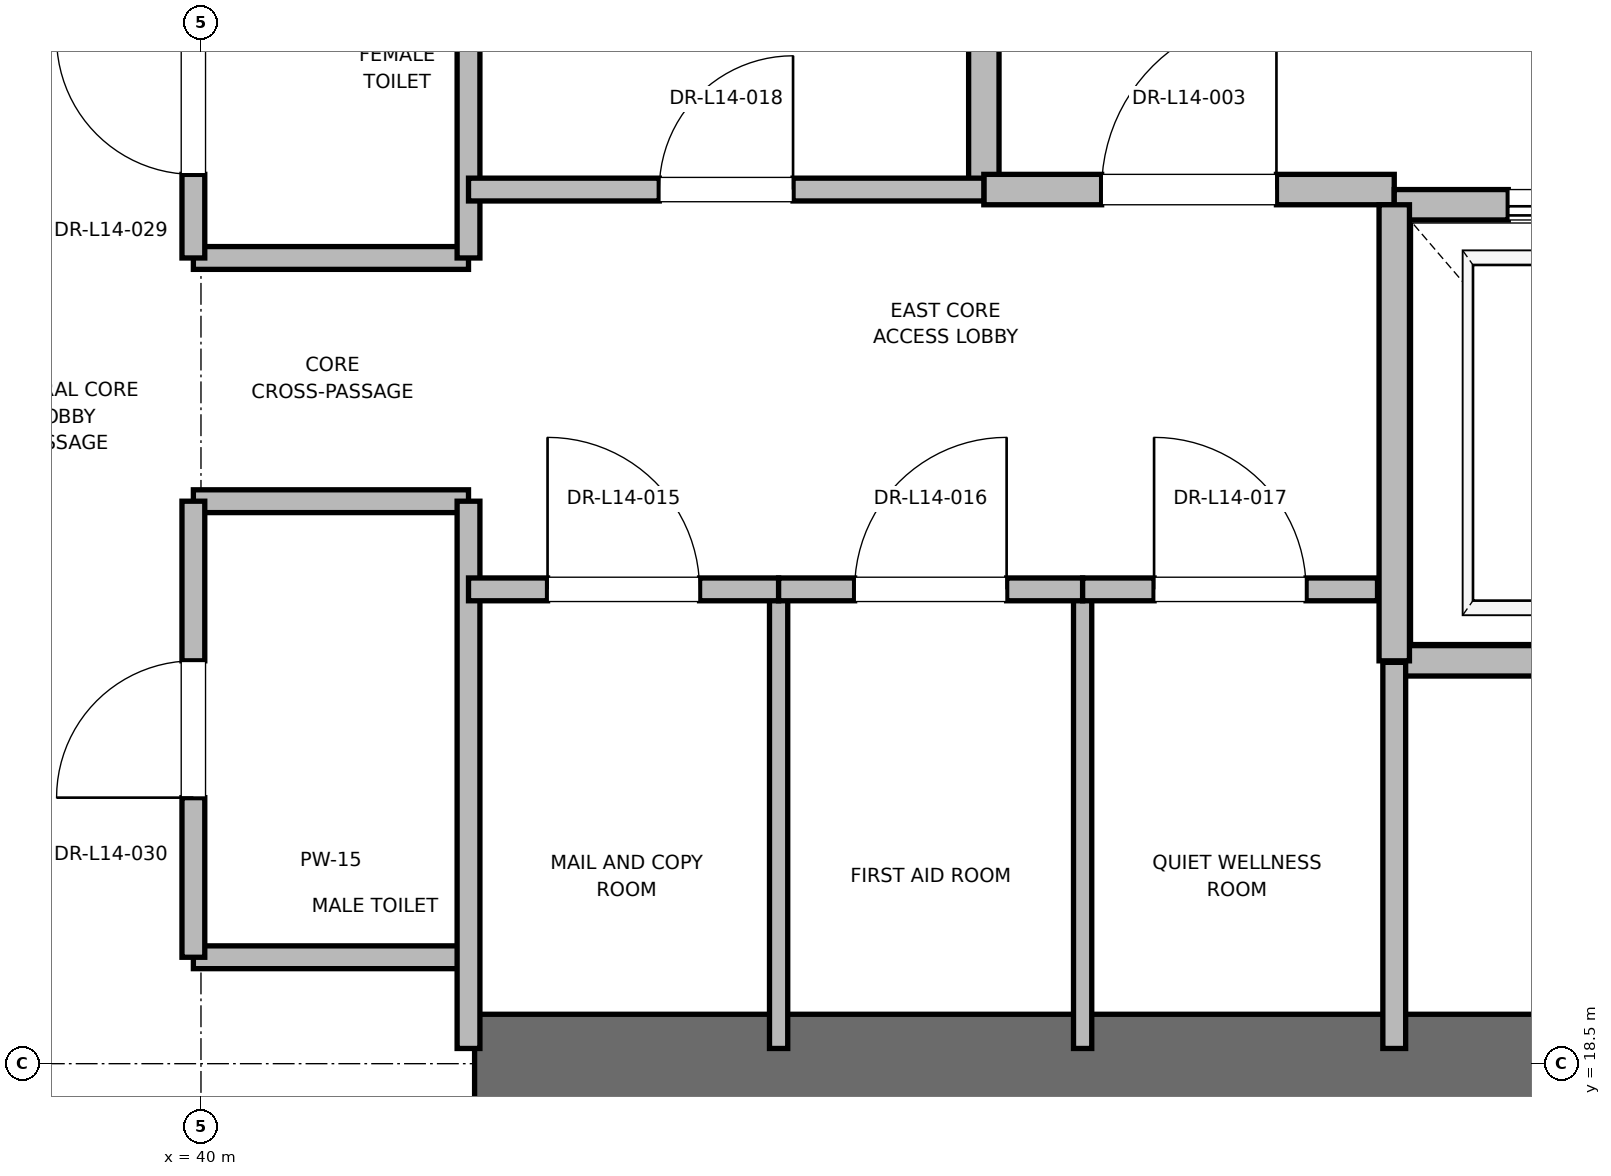
"""IFC4 building model, lengths in metres.
Left out: names, types, materials, properties, quantities, classifications, styles, units other than length and angle.
Written with IfcOpenShell. Run it as: python <this file> out.ifc"""

import sys

from ifc_helpers import new_model, si_unit, direction, frame, frame_2d, origin, place, context, subcontext, project, spatial, rectangle, extrude, element, fill, save


model = new_model("IFC4")
c1 = context("Model", 3, precision=1e-05, world=origin(), true_north=direction((0.0, 1.0)))
c2 = subcontext(c1, "Body", "Model", "MODEL_VIEW")
j1 = project(units=[si_unit("LENGTHUNIT", "METRE"), si_unit("PLANEANGLEUNIT", "RADIAN")], contexts=[c1])
p1 = place(None, origin())
s1 = spatial("IfcSite", under=j1, at=p1, CompositionType="ELEMENT")
p2 = place(p1, origin())
s2 = spatial("IfcBuilding", under=s1, at=p2, CompositionType="ELEMENT")
p3 = place(p2, frame((0.0, 0.0, 63.6)))
s3 = spatial("IfcBuildingStorey", under=s2, at=p3, CompositionType="ELEMENT", Elevation=63.6)
p4 = place(p3, frame((41.8, 18.5, 0.0), z_axis=(0.0, 0.0, 1.0), x_axis=(1.0, 0.0, 0.0)))
e1 = element("IfcWall", 1, at=p4, inside=s3, PredefinedType="SHEAR", context=c2, shape_type="SweptSolid", body=[
    extrude(rectangle(XDim=9.2, YDim=0.65, at=frame_2d((4.6, 0.0))), origin(), (0.0, 0.0, 1.0), 3.76),
])
p5 = place(p3, frame((45.15, 24.25, 0.0), z_axis=(0.0, 0.0, 1.0), x_axis=(0.0, 1.0, 0.0)))
e2 = element("IfcWall", 2, at=p5, inside=s3, PredefinedType="PARTITIONING", context=c2, shape_type="SweptSolid", body=[
    extrude(rectangle(XDim=3.37, YDim=0.2, at=frame_2d((1.685, 0.0))), origin(), (0.0, 0.0, 1.0), 3.76),
])
p6 = place(p3, frame((45.15, 24.25, 0.0), z_axis=(0.0, 0.0, 1.0), x_axis=(1.0, 0.0, 0.0)))
e3 = element("IfcWall", 3, at=p6, inside=s3, PredefinedType="PARTITIONING", context=c2, shape_type="SweptSolid", body=[
    extrude(rectangle(XDim=2.7, YDim=0.2, at=frame_2d((1.35, 0.0))), origin(), (0.0, 0.0, 1.0), 3.76),
])
p7 = place(p6, frame((0.775, 0.0, 0.0)))
e4 = element("IfcOpeningElement", 4, at=p7, cuts=e3, PredefinedType="OPENING", context=c2, shape_type="SweptSolid", body=[
    extrude(rectangle(XDim=1.15, YDim=2.2, at=frame_2d((0.575, 1.1))), frame((0.0, 0.1, 0.0), z_axis=(0.0, -1.0, 0.0), x_axis=(1.0, 0.0, 0.0)), (0.0, 0.0, 1.0), 0.2),
])
p8 = place(p3, frame((47.85, 21.15, 0.0), z_axis=(0.0, 0.0, 1.0), x_axis=(1.0, 0.0, 0.0)))
e5 = element("IfcWall", 5, at=p8, inside=s3, PredefinedType="SOLIDWALL", context=c2, shape_type="SweptSolid", body=[
    extrude(rectangle(XDim=2.6, YDim=0.2, at=frame_2d((1.3, 0.0))), origin(), (0.0, 0.0, 1.0), 3.76),
])
p9 = place(p3, frame((50.45, 24.15, 0.0), z_axis=(0.0, 0.0, 1.0), x_axis=(-1.0, 0.0, 0.0)))
e6 = element("IfcWall", 6, at=p9, inside=s3, PredefinedType="SOLIDWALL", context=c2, shape_type="SweptSolid", body=[
    extrude(rectangle(XDim=2.6, YDim=0.2, at=frame_2d((1.3, 0.0))), origin(), (0.0, 0.0, 1.0), 2.54),
])
p10 = place(p9, frame((0.75, 0.0, 0.0)))
e7 = element("IfcOpeningElement", 7, at=p10, cuts=e6, PredefinedType="OPENING", context=c2, shape_type="SweptSolid", body=[
    extrude(rectangle(XDim=1.1, YDim=2.2, at=frame_2d((0.55, 1.1))), frame((0.0, 0.1, 0.0), z_axis=(0.0, -1.0, 0.0), x_axis=(1.0, 0.0, 0.0)), (0.0, 0.0, 1.0), 0.2),
])
p11 = place(p3, frame((47.85, 24.15, 0.0), z_axis=(0.0, 0.0, 1.0), x_axis=(0.0, -1.0, 0.0)))
e8 = element("IfcWall", 8, at=p11, inside=s3, PredefinedType="SOLIDWALL", context=c2, shape_type="SweptSolid", body=[
    extrude(rectangle(XDim=3.0, YDim=0.2, at=frame_2d((1.5, 0.0))), origin(), (0.0, 0.0, 1.0), 3.76),
])
for number, where, z_axis, x_axis in (
    (9, (39.95, 19.2, 0.0), (0.0, 0.0, 1.0), (1.0, 0.0, 0.0)),
    (10, (39.95, 22.2, 0.0), (0.0, 0.0, 1.0), (1.0, 0.0, 0.0)),
    (11, (39.95, 23.8, 0.0), (0.0, 0.0, 1.0), (1.0, 0.0, 0.0)),
):
    element("IfcWall", number, at=place(p3, frame(where, z_axis=z_axis, x_axis=x_axis)), inside=s3, PredefinedType="PARTITIONING", context=c2, shape_type="SweptSolid", body=[
        extrude(rectangle(XDim=1.81, YDim=0.15, at=frame_2d((0.905, 0.0))), origin(), (0.0, 0.0, 1.0), 2.85),
    ])
p12 = place(p3, frame((41.76, 18.6, 0.0), z_axis=(0.0, 0.0, 1.0), x_axis=(0.0, 1.0, 0.0)))
e12 = element("IfcWall", 12, at=p12, inside=s3, PredefinedType="PARTITIONING", context=c2, shape_type="SweptSolid", body=[
    extrude(rectangle(XDim=3.6, YDim=0.15, at=frame_2d((1.8, 0.0))), origin(), (0.0, 0.0, 1.0), 2.54),
])
p13 = place(p3, frame((41.76, 23.8, 0.0), z_axis=(0.0, 0.0, 1.0), x_axis=(0.0, 1.0, 0.0)))
e13 = element("IfcWall", 13, at=p13, inside=s3, PredefinedType="PARTITIONING", context=c2, shape_type="SweptSolid", body=[
    extrude(rectangle(XDim=4.0, YDim=0.15, at=frame_2d((2.0, 0.0))), origin(), (0.0, 0.0, 1.0), 2.85),
])
p14 = place(p3, frame((39.95, 19.2, 0.0), z_axis=(0.0, 0.0, 1.0), x_axis=(0.0, 1.0, 0.0)))
e14 = element("IfcWall", 14, at=p14, inside=s3, PredefinedType="PARTITIONING", context=c2, shape_type="SweptSolid", body=[
    extrude(rectangle(XDim=3.0, YDim=0.15, at=frame_2d((1.5, 0.0))), origin(), (0.0, 0.0, 1.0), 2.85),
])
p15 = place(p14, frame((1.05, 0.0, 0.0)))
e15 = element("IfcOpeningElement", 15, at=p15, cuts=e14, PredefinedType="OPENING", context=c2, shape_type="SweptSolid", body=[
    extrude(rectangle(XDim=0.9, YDim=2.1, at=frame_2d((0.45, 1.05))), frame((0.0, 0.075, 0.0), z_axis=(0.0, -1.0, 0.0), x_axis=(1.0, 0.0, 0.0)), (0.0, 0.0, 1.0), 0.15),
])
p16 = place(p3, frame((39.95, 23.8, 0.0), z_axis=(0.0, 0.0, 1.0), x_axis=(0.0, 1.0, 0.0)))
e16 = element("IfcWall", 16, at=p16, inside=s3, PredefinedType="PARTITIONING", context=c2, shape_type="SweptSolid", body=[
    extrude(rectangle(XDim=2.0, YDim=0.15, at=frame_2d((1.0, 0.0))), origin(), (0.0, 0.0, 1.0), 2.85),
])
p17 = place(p16, frame((0.55, 0.0, 0.0)))
e17 = element("IfcOpeningElement", 17, at=p17, cuts=e16, PredefinedType="OPENING", context=c2, shape_type="SweptSolid", body=[
    extrude(rectangle(XDim=0.9, YDim=2.1, at=frame_2d((0.45, 1.05))), frame((0.0, 0.075, 0.0), z_axis=(0.0, -1.0, 0.0), x_axis=(1.0, 0.0, 0.0)), (0.0, 0.0, 1.0), 0.15),
])
p18 = place(p3, frame((47.85, 18.6, 0.0), z_axis=(0.0, 0.0, 1.0), x_axis=(0.0, 1.0, 0.0)))
e18 = element("IfcWall", 18, at=p18, inside=s3, PredefinedType="PARTITIONING", context=c2, shape_type="SweptSolid", body=[
    extrude(rectangle(XDim=2.54, YDim=0.15, at=frame_2d((1.27, 0.0))), origin(), (0.0, 0.0, 1.0), 2.85),
])
for number, where, z_axis, x_axis in (
    (19, (43.8, 18.6, 0.0), (0.0, 0.0, 1.0), (0.0, 1.0, 0.0)),
    (20, (45.8, 18.6, 0.0), (0.0, 0.0, 1.0), (0.0, 1.0, 0.0)),
):
    element("IfcWall", number, at=place(p3, frame(where, z_axis=z_axis, x_axis=x_axis)), inside=s3, PredefinedType="PARTITIONING", context=c2, shape_type="SweptSolid", body=[
        extrude(rectangle(XDim=3.02, YDim=0.12, at=frame_2d((1.51, 0.0))), origin(), (0.0, 0.0, 1.0), 2.85),
    ])
p19 = place(p3, frame((41.76, 21.62, 0.0), z_axis=(0.0, 0.0, 1.0), x_axis=(1.0, 0.0, 0.0)))
e21 = element("IfcWall", 21, at=p19, inside=s3, PredefinedType="PARTITIONING", context=c2, shape_type="SweptSolid", body=[
    extrude(rectangle(XDim=2.04, YDim=0.15, at=frame_2d((1.02, 0.0))), origin(), (0.0, 0.0, 1.0), 2.85),
])
p20 = place(p19, frame((0.52, 0.0, 0.0)))
e22 = element("IfcOpeningElement", 22, at=p20, cuts=e21, PredefinedType="OPENING", context=c2, shape_type="SweptSolid", body=[
    extrude(rectangle(XDim=1.0, YDim=2.15, at=frame_2d((0.5, 1.075))), frame((0.0, 0.075, 0.0), z_axis=(0.0, -1.0, 0.0), x_axis=(1.0, 0.0, 0.0)), (0.0, 0.0, 1.0), 0.15),
])
p21 = place(p3, frame((43.8, 21.62, 0.0), z_axis=(0.0, 0.0, 1.0), x_axis=(1.0, 0.0, 0.0)))
e23 = element("IfcWall", 23, at=p21, inside=s3, PredefinedType="PARTITIONING", context=c2, shape_type="SweptSolid", body=[
    extrude(rectangle(XDim=2.0, YDim=0.15, at=frame_2d((1.0, 0.0))), origin(), (0.0, 0.0, 1.0), 2.85),
])
p22 = place(p21, frame((0.5, 0.0, 0.0)))
e24 = element("IfcOpeningElement", 24, at=p22, cuts=e23, PredefinedType="OPENING", context=c2, shape_type="SweptSolid", body=[
    extrude(rectangle(XDim=1.0, YDim=2.15, at=frame_2d((0.5, 1.075))), frame((0.0, 0.075, 0.0), z_axis=(0.0, -1.0, 0.0), x_axis=(1.0, 0.0, 0.0)), (0.0, 0.0, 1.0), 0.15),
])
p23 = place(p3, frame((45.8, 21.62, 0.0), z_axis=(0.0, 0.0, 1.0), x_axis=(1.0, 0.0, 0.0)))
e25 = element("IfcWall", 25, at=p23, inside=s3, PredefinedType="PARTITIONING", context=c2, shape_type="SweptSolid", body=[
    extrude(rectangle(XDim=1.94, YDim=0.15, at=frame_2d((0.97, 0.0))), origin(), (0.0, 0.0, 1.0), 2.85),
])
p24 = place(p23, frame((0.47, 0.0, 0.0)))
e26 = element("IfcOpeningElement", 26, at=p24, cuts=e25, PredefinedType="OPENING", context=c2, shape_type="SweptSolid", body=[
    extrude(rectangle(XDim=1.0, YDim=2.15, at=frame_2d((0.5, 1.075))), frame((0.0, 0.075, 0.0), z_axis=(0.0, -1.0, 0.0), x_axis=(1.0, 0.0, 0.0)), (0.0, 0.0, 1.0), 0.15),
])
p25 = place(p3, frame((41.76, 24.25, 0.0), z_axis=(0.0, 0.0, 1.0), x_axis=(1.0, 0.0, 0.0)))
e27 = element("IfcWall", 27, at=p25, inside=s3, PredefinedType="PARTITIONING", context=c2, shape_type="SweptSolid", body=[
    extrude(rectangle(XDim=3.39, YDim=0.15, at=frame_2d((1.695, 0.0))), origin(), (0.0, 0.0, 1.0), 2.85),
])
p26 = place(p25, frame((1.255, 0.0, 0.0)))
e28 = element("IfcOpeningElement", 28, at=p26, cuts=e27, PredefinedType="OPENING", context=c2, shape_type="SweptSolid", body=[
    extrude(rectangle(XDim=0.88, YDim=2.1, at=frame_2d((0.44, 1.05))), frame((0.0, 0.075, 0.0), z_axis=(0.0, -1.0, 0.0), x_axis=(1.0, 0.0, 0.0)), (0.0, 0.0, 1.0), 0.15),
])
p27 = place(p7, origin())
e29 = element("IfcDoor", 29, at=p27, inside=s3, OperationType="SINGLE_SWING_RIGHT", PredefinedType="DOOR", context=c2, shape_type="SweptSolid", body=[
    extrude(rectangle(XDim=1.15, YDim=2.2, at=frame_2d((0.575, 1.1))), frame((0.0, 0.025, 0.0), z_axis=(0.0, -1.0, 0.0), x_axis=(1.0, 0.0, 0.0)), (0.0, 0.0, 1.0), 0.05),
])
fill(e4, e29)
p28 = place(p10, origin())
e30 = element("IfcDoor", 30, at=p28, inside=s3, OperationType="SLIDING_TO_RIGHT", PredefinedType="DOOR", context=c2, shape_type="SweptSolid", body=[
    extrude(rectangle(XDim=1.1, YDim=2.2, at=frame_2d((0.55, 1.1))), frame((0.0, 0.025, 0.0), z_axis=(0.0, -1.0, 0.0), x_axis=(1.0, 0.0, 0.0)), (0.0, 0.0, 1.0), 0.05),
])
fill(e7, e30)
p29 = place(p15, origin())
e31 = element("IfcDoor", 31, at=p29, inside=s3, OperationType="SINGLE_SWING_LEFT", PredefinedType="DOOR", context=c2, shape_type="SweptSolid", body=[
    extrude(rectangle(XDim=0.9, YDim=2.1, at=frame_2d((0.45, 1.05))), frame((0.0, 0.025, 0.0), z_axis=(0.0, -1.0, 0.0), x_axis=(1.0, 0.0, 0.0)), (0.0, 0.0, 1.0), 0.05),
])
fill(e15, e31)
p30 = place(p17, origin())
e32 = element("IfcDoor", 32, at=p30, inside=s3, OperationType="SINGLE_SWING_RIGHT", PredefinedType="DOOR", context=c2, shape_type="SweptSolid", body=[
    extrude(rectangle(XDim=0.9, YDim=2.1, at=frame_2d((0.45, 1.05))), frame((0.0, 0.025, 0.0), z_axis=(0.0, -1.0, 0.0), x_axis=(1.0, 0.0, 0.0)), (0.0, 0.0, 1.0), 0.05),
])
fill(e17, e32)
p31 = place(p20, origin())
e33 = element("IfcDoor", 33, at=p31, inside=s3, OperationType="SINGLE_SWING_LEFT", PredefinedType="DOOR", context=c2, shape_type="SweptSolid", body=[
    extrude(rectangle(XDim=1.0, YDim=2.15, at=frame_2d((0.5, 1.075))), frame((0.0, 0.025, 0.0), z_axis=(0.0, -1.0, 0.0), x_axis=(1.0, 0.0, 0.0)), (0.0, 0.0, 1.0), 0.05),
])
fill(e22, e33)
p32 = place(p22, origin())
e34 = element("IfcDoor", 34, at=p32, inside=s3, OperationType="SINGLE_SWING_RIGHT", PredefinedType="DOOR", context=c2, shape_type="SweptSolid", body=[
    extrude(rectangle(XDim=1.0, YDim=2.15, at=frame_2d((0.5, 1.075))), frame((0.0, 0.025, 0.0), z_axis=(0.0, -1.0, 0.0), x_axis=(1.0, 0.0, 0.0)), (0.0, 0.0, 1.0), 0.05),
])
fill(e24, e34)
p33 = place(p24, origin())
e35 = element("IfcDoor", 35, at=p33, inside=s3, OperationType="SINGLE_SWING_LEFT", PredefinedType="DOOR", context=c2, shape_type="SweptSolid", body=[
    extrude(rectangle(XDim=1.0, YDim=2.15, at=frame_2d((0.5, 1.075))), frame((0.0, 0.025, 0.0), z_axis=(0.0, -1.0, 0.0), x_axis=(1.0, 0.0, 0.0)), (0.0, 0.0, 1.0), 0.05),
])
fill(e26, e35)
p34 = place(p26, origin())
e36 = element("IfcDoor", 36, at=p34, inside=s3, OperationType="SINGLE_SWING_RIGHT", PredefinedType="DOOR", context=c2, shape_type="SweptSolid", body=[
    extrude(rectangle(XDim=0.88, YDim=2.1, at=frame_2d((0.44, 1.05))), frame((0.0, 0.025, 0.0), z_axis=(0.0, -1.0, 0.0), x_axis=(1.0, 0.0, 0.0)), (0.0, 0.0, 1.0), 0.05),
])
fill(e28, e36)
save(model, sys.argv[1])
